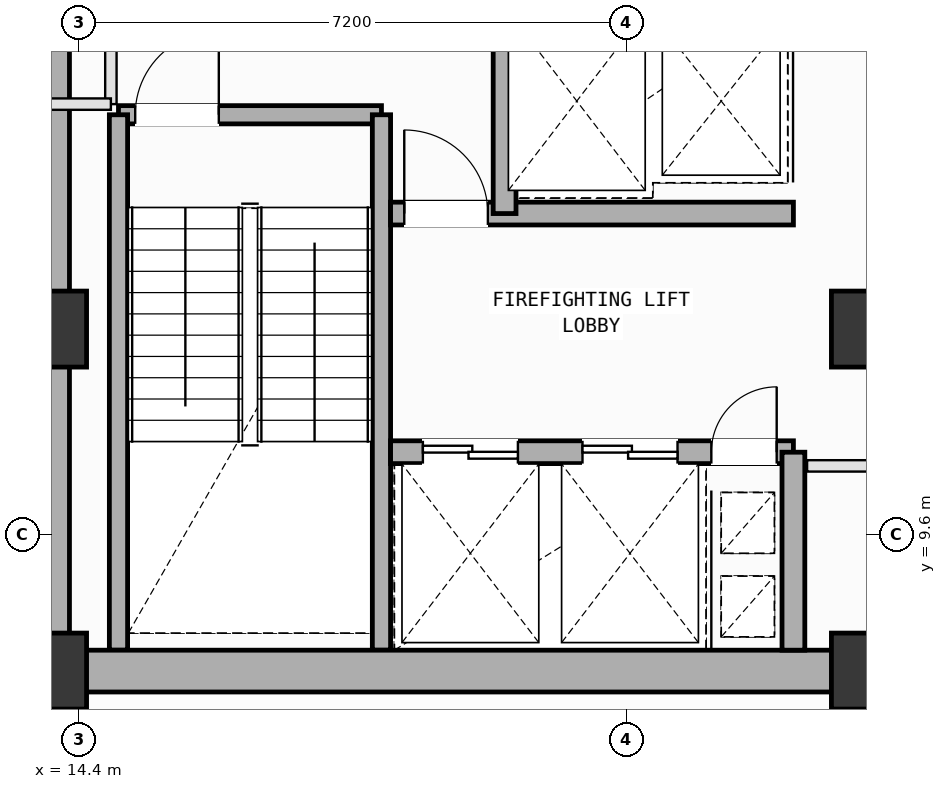
"""IFC4 building model, lengths in metres.
Left out: names, types, materials, properties, quantities, classifications, styles, units other than length and angle.
Written with IfcOpenShell. Run it as: python <this file> out.ifc"""

import sys

from ifc_helpers import new_model, si_unit, direction, frame, frame_2d, origin, origin_2d, place, context, subcontext, project, spatial, rectangle, extrude, element, fill, save


model = new_model("IFC4")
c1 = context("Model", 3, precision=1e-05, world=origin(), true_north=direction((0.0, 1.0)))
c2 = subcontext(c1, "Body", "Model", "MODEL_VIEW")
j1 = project(units=[si_unit("LENGTHUNIT", "METRE"), si_unit("PLANEANGLEUNIT", "RADIAN")], contexts=[c1])
p1 = place(None, origin())
s1 = spatial("IfcSite", under=j1, at=p1, CompositionType="ELEMENT")
p2 = place(p1, origin())
s2 = spatial("IfcBuilding", under=s1, at=p2, CompositionType="ELEMENT")
p3 = place(p2, frame((0.0, 0.0, 235.2)))
s3 = spatial("IfcBuildingStorey", under=s2, at=p3, CompositionType="ELEMENT", Elevation=235.2)
for number, where, z_axis, x_axis in (
    (1, (14.0, 7.8, 0.0), (0.0, 0.0, 1.0), (1.0, 0.0, 0.0)),
    (2, (14.0, 12.3, 0.0), (0.0, 0.0, 1.0), (1.0, 0.0, 0.0)),
    (3, (24.8, 7.8, 0.0), (0.0, 0.0, 1.0), (1.0, 0.0, 0.0)),
    (4, (24.8, 12.3, 0.0), (0.0, 0.0, 1.0), (1.0, 0.0, 0.0)),
):
    element("IfcColumn", number, at=place(p3, frame(where, z_axis=z_axis, x_axis=x_axis)), inside=s3, PredefinedType="COLUMN", context=c2, shape_type="SweptSolid", body=[
        extrude(rectangle(XDim=1.0, YDim=1.0, at=origin_2d()), origin(), (0.0, 0.0, 1.0), 4.0),
    ])
p4 = place(p3, frame((14.127, 5.337, 0.0), z_axis=(0.0, 0.0, 1.0), x_axis=(-0.75928012576, 0.650763928492, 0.0)))
e5 = element("IfcWall", 5, at=p4, inside=s3, PredefinedType="SOLIDWALL", context=c2, shape_type="SweptSolid", body=[
    extrude(rectangle(XDim=5.861, YDim=0.28, at=frame_2d((2.93, 0.0))), origin(), (0.0, 0.0, 1.0), 3.265),
])
p5 = place(p4, frame((0.973, 0.0, 0.75)))
e6 = element("IfcOpeningElement", 6, at=p5, cuts=e5, PredefinedType="OPENING", context=c2, shape_type="SweptSolid", body=[
    extrude(rectangle(XDim=1.8, YDim=2.05, at=frame_2d((0.9, 1.025))), frame((0.0, 0.15, 0.0), z_axis=(0.0, -1.0, 0.0), x_axis=(1.0, 0.0, 0.0)), (0.0, 0.0, 1.0), 0.3),
])
p6 = place(p3, frame((14.92, 15.12, 0.0), z_axis=(0.0, 0.0, 1.0), x_axis=(1.0, 0.0, 0.0)))
e7 = element("IfcWall", 7, at=p6, inside=s3, PredefinedType="SOLIDWALL", context=c2, shape_type="SweptSolid", body=[
    extrude(rectangle(XDim=3.46, YDim=0.24, at=frame_2d((1.73, 0.0))), origin(), (0.0, 0.0, 1.0), 3.78),
])
p7 = place(p6, frame((0.22, 0.0, 0.0)))
e8 = element("IfcOpeningElement", 8, at=p7, cuts=e7, PredefinedType="OPENING", context=c2, shape_type="SweptSolid", body=[
    extrude(rectangle(XDim=1.1, YDim=2.15, at=frame_2d((0.55, 1.075))), frame((0.0, 0.13, 0.0), z_axis=(0.0, -1.0, 0.0), x_axis=(1.0, 0.0, 0.0)), (0.0, 0.0, 1.0), 0.26),
])
for number, where, z_axis, x_axis in (
    (9, (18.38, 15.12, 0.0), (0.0, 0.0, 1.0), (0.0, -1.0, 0.0)),
    (10, (14.92, 8.075, 0.0), (0.0, 0.0, 1.0), (0.0, 1.0, 0.0)),
):
    element("IfcWall", number, at=place(p3, frame(where, z_axis=z_axis, x_axis=x_axis)), inside=s3, PredefinedType="SOLIDWALL", context=c2, shape_type="SweptSolid", body=[
        extrude(rectangle(XDim=7.045, YDim=0.24, at=frame_2d((3.522, 0.0))), origin(), (0.0, 0.0, 1.0), 3.78),
    ])
p8 = place(p3, frame((14.0, 7.8, 0.0), z_axis=(0.0, 0.0, 1.0), x_axis=(1.0, 0.0, 0.0)))
e11 = element("IfcWall", 11, at=p8, inside=s3, PredefinedType="SHEAR", context=c2, shape_type="SweptSolid", body=[
    extrude(rectangle(XDim=10.8, YDim=0.55, at=frame_2d((5.4, 0.0))), origin(), (0.0, 0.0, 1.0), 3.78),
])
p9 = place(p3, frame((14.0, 16.8, 0.0), z_axis=(0.0, 0.0, 1.0), x_axis=(0.0, -1.0, 0.0)))
e12 = element("IfcWall", 12, at=p9, inside=s3, PredefinedType="SHEAR", context=c2, shape_type="SweptSolid", body=[
    extrude(rectangle(XDim=9.0, YDim=0.55, at=frame_2d((4.5, 0.0))), origin(), (0.0, 0.0, 1.0), 3.78),
])
p10 = place(p3, frame((18.5, 10.68, 0.0), z_axis=(0.0, 0.0, 1.0), x_axis=(1.0, 0.0, 0.0)))
e13 = element("IfcWall", 13, at=p10, inside=s3, PredefinedType="SOLIDWALL", context=c2, shape_type="SweptSolid", body=[
    extrude(rectangle(XDim=5.3, YDim=0.3, at=frame_2d((2.65, 0.0))), origin(), (0.0, 0.0, 1.0), 3.78),
])
p11 = place(p10, frame((4.22, 0.0, 0.0)))
e14 = element("IfcOpeningElement", 14, at=p11, cuts=e13, PredefinedType="OPENING", context=c2, shape_type="SweptSolid", body=[
    extrude(rectangle(XDim=0.86, YDim=2.06, at=frame_2d((0.43, 1.03))), frame((0.0, 0.16, 0.0), z_axis=(0.0, -1.0, 0.0), x_axis=(1.0, 0.0, 0.0)), (0.0, 0.0, 1.0), 0.32),
])
p12 = place(p10, frame((0.425, 0.0, 0.0)))
e15 = element("IfcOpeningElement", 15, at=p12, cuts=e13, PredefinedType="OPENING", context=c2, shape_type="SweptSolid", body=[
    extrude(rectangle(XDim=1.25, YDim=2.18, at=frame_2d((0.625, 1.09))), frame((0.0, 0.16, 0.0), z_axis=(0.0, -1.0, 0.0), x_axis=(1.0, 0.0, 0.0)), (0.0, 0.0, 1.0), 0.32),
])
p13 = place(p10, frame((2.525, 0.0, 0.0)))
e16 = element("IfcOpeningElement", 16, at=p13, cuts=e13, PredefinedType="OPENING", context=c2, shape_type="SweptSolid", body=[
    extrude(rectangle(XDim=1.25, YDim=2.18, at=frame_2d((0.625, 1.09))), frame((0.0, 0.16, 0.0), z_axis=(0.0, -1.0, 0.0), x_axis=(1.0, 0.0, 0.0)), (0.0, 0.0, 1.0), 0.32),
])
p14 = place(p3, frame((18.5, 13.82, 0.0), z_axis=(0.0, 0.0, 1.0), x_axis=(1.0, 0.0, 0.0)))
e17 = element("IfcWall", 17, at=p14, inside=s3, PredefinedType="SOLIDWALL", context=c2, shape_type="SweptSolid", body=[
    extrude(rectangle(XDim=5.3, YDim=0.3, at=frame_2d((2.65, 0.0))), origin(), (0.0, 0.0, 1.0), 3.78),
])
p15 = place(p14, frame((0.18, 0.0, 0.0)))
e18 = element("IfcOpeningElement", 18, at=p15, cuts=e17, PredefinedType="OPENING", context=c2, shape_type="SweptSolid", body=[
    extrude(rectangle(XDim=1.1, YDim=2.15, at=frame_2d((0.55, 1.075))), frame((0.0, 0.16, 0.0), z_axis=(0.0, -1.0, 0.0), x_axis=(1.0, 0.0, 0.0)), (0.0, 0.0, 1.0), 0.32),
])
p16 = place(p3, frame((23.8, 8.075, 0.0), z_axis=(0.0, 0.0, 1.0), x_axis=(0.0, 1.0, 0.0)))
e19 = element("IfcWall", 19, at=p16, inside=s3, PredefinedType="SOLIDWALL", context=c2, shape_type="SweptSolid", body=[
    extrude(rectangle(XDim=2.605, YDim=0.3, at=frame_2d((1.302, 0.0))), origin(), (0.0, 0.0, 1.0), 3.78),
])
p17 = place(p3, frame((20.0, 13.82, 0.0), z_axis=(0.0, 0.0, 1.0), x_axis=(0.0, 1.0, 0.0)))
e20 = element("IfcWall", 20, at=p17, inside=s3, PredefinedType="SOLIDWALL", context=c2, shape_type="SweptSolid", body=[
    extrude(rectangle(XDim=2.73, YDim=0.3, at=frame_2d((1.365, 0.0))), origin(), (0.0, 0.0, 1.0), 3.78),
])
p18 = place(p3, frame((23.98, 10.5, 0.0), z_axis=(0.0, 0.0, 1.0), x_axis=(1.0, 0.0, 0.0)))
e21 = element("IfcWall", 21, at=p18, inside=s3, PredefinedType="PARTITIONING", context=c2, shape_type="SweptSolid", body=[
    extrude(rectangle(XDim=5.4, YDim=0.15, at=frame_2d((2.7, 0.0))), origin(), (0.0, 0.0, 1.0), 3.78),
])
p19 = place(p18, frame((3.703, 0.0, 0.0)))
e22 = element("IfcOpeningElement", 22, at=p19, cuts=e21, PredefinedType="OPENING", context=c2, shape_type="SweptSolid", body=[
    extrude(rectangle(XDim=0.86, YDim=2.06, at=frame_2d((0.43, 1.03))), frame((0.0, 0.085, 0.0), z_axis=(0.0, -1.0, 0.0), x_axis=(1.0, 0.0, 0.0)), (0.0, 0.0, 1.0), 0.17),
])
p20 = place(p3, frame((22.379, -1.584, 0.0), z_axis=(0.0, 0.0, 1.0), x_axis=(0.650778183547, 0.759267907803, 0.0)))
e23 = element("IfcWall", 23, at=p20, inside=s3, PredefinedType="PARTITIONING", context=c2, shape_type="SweptSolid", body=[
    extrude(rectangle(XDim=12.195, YDim=0.15, at=frame_2d((6.097, 0.0))), origin(), (0.0, 0.0, 1.0), 3.78),
])
p21 = place(p3, frame((29.412, 7.675, 0.0), z_axis=(0.0, 0.0, 1.0), x_axis=(-0.65075326378, -0.759289266143, 0.0)))
e24 = element("IfcWall", 24, at=p21, inside=s3, PredefinedType="PARTITIONING", context=c2, shape_type="SweptSolid", body=[
    extrude(rectangle(XDim=11.607, YDim=0.15, at=frame_2d((5.803, 0.0))), origin(), (0.0, 0.0, 1.0), 3.78),
])
p22 = place(p3, frame((14.82, 18.2, 0.0), z_axis=(0.0, 0.0, 1.0), x_axis=(0.0, -1.0, 0.0)))
e25 = element("IfcWall", 25, at=p22, inside=s3, PredefinedType="PARTITIONING", context=c2, shape_type="SweptSolid", body=[
    extrude(rectangle(XDim=2.94, YDim=0.15, at=frame_2d((1.47, 0.0))), origin(), (0.0, 0.0, 1.0), 3.78),
])
p23 = place(p3, frame((14.82, 15.26, 0.0), z_axis=(0.0, 0.0, 1.0), x_axis=(-1.0, 0.0, 0.0)))
e26 = element("IfcWall", 26, at=p23, inside=s3, PredefinedType="PARTITIONING", context=c2, shape_type="SweptSolid", body=[
    extrude(rectangle(XDim=1.12, YDim=0.15, at=frame_2d((0.56, 0.0))), origin(), (0.0, 0.0, 1.0), 3.78),
])
p24 = place(p7, origin())
e27 = element("IfcDoor", 27, at=p24, inside=s3, OperationType="SINGLE_SWING_RIGHT", PredefinedType="DOOR", context=c2, shape_type="SweptSolid", body=[
    extrude(rectangle(XDim=1.1, YDim=2.15, at=frame_2d((0.55, 1.075))), frame((0.0, 0.025, 0.0), z_axis=(0.0, -1.0, 0.0), x_axis=(1.0, 0.0, 0.0)), (0.0, 0.0, 1.0), 0.05),
])
fill(e8, e27)
p25 = place(p11, origin())
e28 = element("IfcDoor", 28, at=p25, inside=s3, OperationType="SINGLE_SWING_RIGHT", PredefinedType="DOOR", context=c2, shape_type="SweptSolid", body=[
    extrude(rectangle(XDim=0.86, YDim=2.06, at=frame_2d((0.43, 1.03))), frame((0.0, 0.025, 0.0), z_axis=(0.0, -1.0, 0.0), x_axis=(1.0, 0.0, 0.0)), (0.0, 0.0, 1.0), 0.05),
])
fill(e14, e28)
p26 = place(p15, origin())
e29 = element("IfcDoor", 29, at=p26, inside=s3, OperationType="SINGLE_SWING_LEFT", PredefinedType="DOOR", context=c2, shape_type="SweptSolid", body=[
    extrude(rectangle(XDim=1.1, YDim=2.15, at=frame_2d((0.55, 1.075))), frame((0.0, 0.025, 0.0), z_axis=(0.0, -1.0, 0.0), x_axis=(1.0, 0.0, 0.0)), (0.0, 0.0, 1.0), 0.05),
])
fill(e18, e29)
p27 = place(p12, origin())
e30 = element("IfcDoor", 30, at=p27, inside=s3, OperationType="DOUBLE_DOOR_SLIDING", PredefinedType="DOOR", context=c2, shape_type="SweptSolid", body=[
    extrude(rectangle(XDim=1.25, YDim=2.18, at=frame_2d((0.625, 1.09))), frame((0.0, 0.025, 0.0), z_axis=(0.0, -1.0, 0.0), x_axis=(1.0, 0.0, 0.0)), (0.0, 0.0, 1.0), 0.05),
])
fill(e15, e30)
p28 = place(p13, origin())
e31 = element("IfcDoor", 31, at=p28, inside=s3, OperationType="DOUBLE_DOOR_SLIDING", PredefinedType="DOOR", context=c2, shape_type="SweptSolid", body=[
    extrude(rectangle(XDim=1.25, YDim=2.18, at=frame_2d((0.625, 1.09))), frame((0.0, 0.025, 0.0), z_axis=(0.0, -1.0, 0.0), x_axis=(1.0, 0.0, 0.0)), (0.0, 0.0, 1.0), 0.05),
])
fill(e16, e31)
save(model, sys.argv[1])
